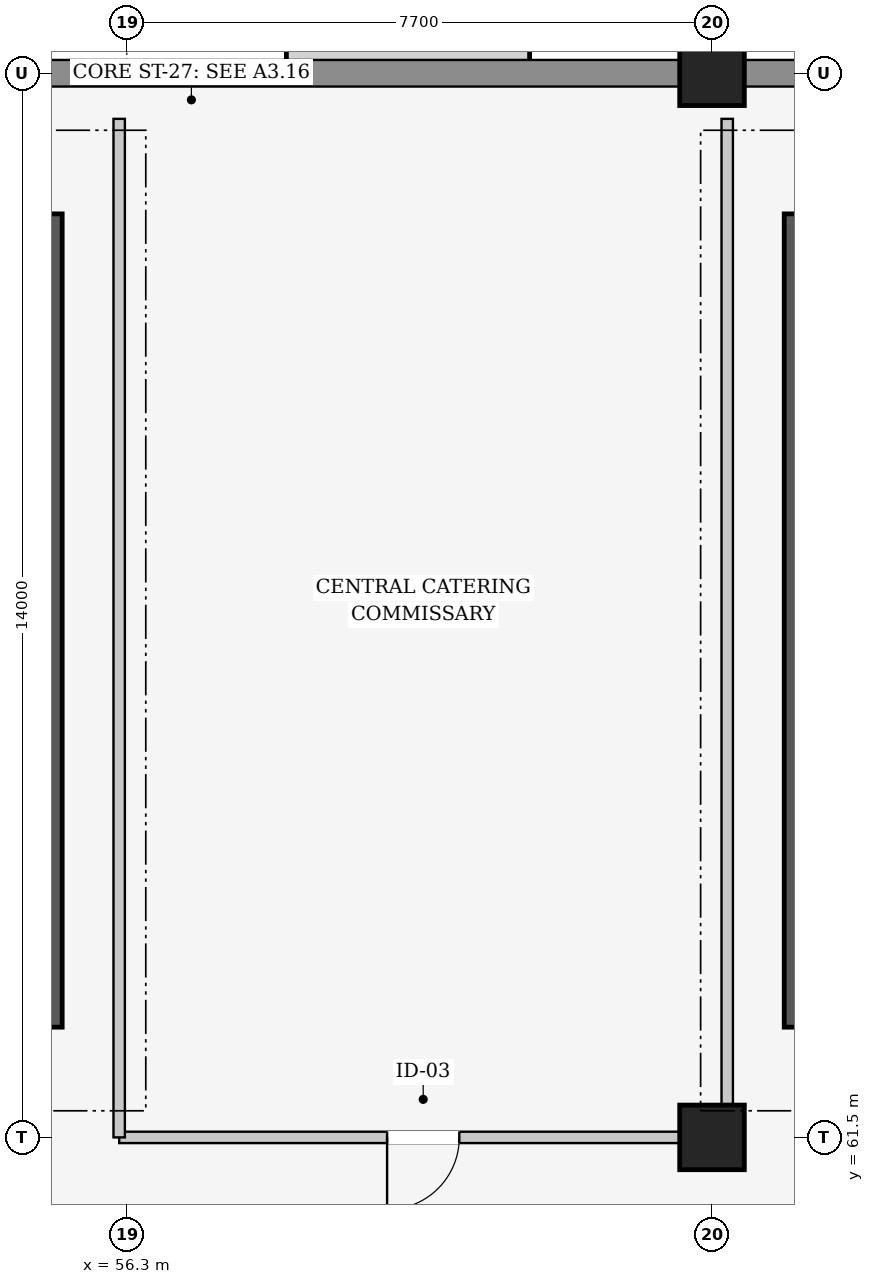
"""IFC4 building model, lengths in metres.
Left out: names, types, materials, properties, quantities, classifications, styles, units other than length and angle.
Written with IfcOpenShell. Run it as: python <this file> out.ifc"""

import sys

from ifc_helpers import new_model, si_unit, direction, frame, frame_2d, origin, origin_2d, place, context, subcontext, project, spatial, rectangle, extrude, element, fill, save


model = new_model("IFC4")
c1 = context("Model", 3, precision=1e-05, world=origin(), true_north=direction((0.0, 1.0)))
c2 = subcontext(c1, "Body", "Model", "MODEL_VIEW")
j1 = project(units=[si_unit("LENGTHUNIT", "METRE"), si_unit("PLANEANGLEUNIT", "RADIAN")], contexts=[c1])
p1 = place(None, origin())
s1 = spatial("IfcSite", under=j1, at=p1, CompositionType="ELEMENT")
p2 = place(p1, origin())
s2 = spatial("IfcBuilding", under=s1, at=p2, CompositionType="ELEMENT")
p3 = place(p2, frame((0.0, 0.0, 6.0)))
s3 = spatial("IfcBuildingStorey", under=s2, at=p3, CompositionType="ELEMENT", Elevation=6.0)
for number, where, z_axis, x_axis in (
    (1, (64.0, 61.5, 0.0), (0.0, 0.0, 1.0), (1.0, 0.0, 0.0)),
    (2, (64.0, 75.5, 0.0), (0.0, 0.0, 1.0), (1.0, 0.0, 0.0)),
):
    element("IfcColumn", number, at=place(p3, frame(where, z_axis=z_axis, x_axis=x_axis)), inside=s3, PredefinedType="COLUMN", context=c2, shape_type="SweptSolid", body=[
        extrude(rectangle(XDim=0.85, YDim=0.85, at=origin_2d()), origin(), (0.0, 0.0, 1.0), 5.4),
    ])
p4 = place(p3, frame((48.407, 75.5, 0.0), z_axis=(0.0, 0.0, 1.0), x_axis=(1.0, 0.0, 0.0)))
e3 = element("IfcWall", 3, at=p4, inside=s3, PredefinedType="SOLIDWALL", context=c2, shape_type="SweptSolid", body=[
    extrude(rectangle(XDim=15.186, YDim=0.35, at=frame_2d((7.593, 0.0))), origin(), (0.0, 0.0, 1.0), 4.12),
])
p5 = place(p3, frame((64.407, 75.5, 0.0), z_axis=(0.0, 0.0, 1.0), x_axis=(1.0, 0.0, 0.0)))
e4 = element("IfcWall", 4, at=p5, inside=s3, PredefinedType="SOLIDWALL", context=c2, shape_type="SweptSolid", body=[
    extrude(rectangle(XDim=7.186, YDim=0.35, at=frame_2d((3.593, 0.0))), origin(), (0.0, 0.0, 1.0), 4.32),
])
for number, where, z_axis, x_axis in (
    (5, (55.325, 73.65, 0.0), (0.0, 0.0, 1.0), (0.0, -1.0, 0.0)),
    (6, (65.075, 62.95, 0.0), (0.0, 0.0, 1.0), (0.0, 1.0, 0.0)),
):
    element("IfcWall", number, at=place(p3, frame(where, z_axis=z_axis, x_axis=x_axis)), inside=s3, PredefinedType="SHEAR", context=c2, shape_type="SweptSolid", body=[
        extrude(rectangle(XDim=10.7, YDim=0.25, at=frame_2d((5.35, 0.0))), origin(), (0.0, 0.0, 1.0), 5.4),
    ])
p6 = place(p3, frame((64.2, 61.5, 0.0), z_axis=(0.0, 0.0, 1.0), x_axis=(-1.0, 0.0, 0.0)))
e7 = element("IfcWall", 7, at=p6, inside=s3, PredefinedType="PARTITIONING", context=c2, shape_type="SweptSolid", body=[
    extrude(rectangle(XDim=8.0, YDim=0.15, at=frame_2d((4.0, 0.0))), origin(), (0.0, 0.0, 1.0), 4.105),
])
p7 = place(p6, frame((3.525, 0.0, 0.0)))
e8 = element("IfcOpeningElement", 8, at=p7, cuts=e7, PredefinedType="OPENING", context=c2, shape_type="SweptSolid", body=[
    extrude(rectangle(XDim=0.95, YDim=2.15, at=frame_2d((0.475, 1.075))), frame((0.0, 0.085, 0.0), z_axis=(0.0, -1.0, 0.0), x_axis=(1.0, 0.0, 0.0)), (0.0, 0.0, 1.0), 0.17),
])
p8 = place(p3, frame((64.2, 74.9, 0.0), z_axis=(0.0, 0.0, 1.0), x_axis=(0.0, -1.0, 0.0)))
e9 = element("IfcWall", 9, at=p8, inside=s3, PredefinedType="PARTITIONING", context=c2, shape_type="SweptSolid", body=[
    extrude(rectangle(XDim=13.4, YDim=0.15, at=frame_2d((6.7, 0.0))), origin(), (0.0, 0.0, 1.0), 4.305),
])
p9 = place(p3, frame((56.2, 61.5, 0.0), z_axis=(0.0, 0.0, 1.0), x_axis=(0.0, 1.0, 0.0)))
e10 = element("IfcWall", 10, at=p9, inside=s3, PredefinedType="PARTITIONING", context=c2, shape_type="SweptSolid", body=[
    extrude(rectangle(XDim=13.4, YDim=0.15, at=frame_2d((6.7, 0.0))), origin(), (0.0, 0.0, 1.0), 4.105),
])
p10 = place(p7, origin())
e11 = element("IfcDoor", 11, at=p10, inside=s3, OperationType="SINGLE_SWING_RIGHT", PredefinedType="DOOR", context=c2, shape_type="SweptSolid", body=[
    extrude(rectangle(XDim=0.95, YDim=2.15, at=frame_2d((0.475, 1.075))), frame((0.0, 0.025, 0.0), z_axis=(0.0, -1.0, 0.0), x_axis=(1.0, 0.0, 0.0)), (0.0, 0.0, 1.0), 0.05),
])
fill(e8, e11)
save(model, sys.argv[1])
